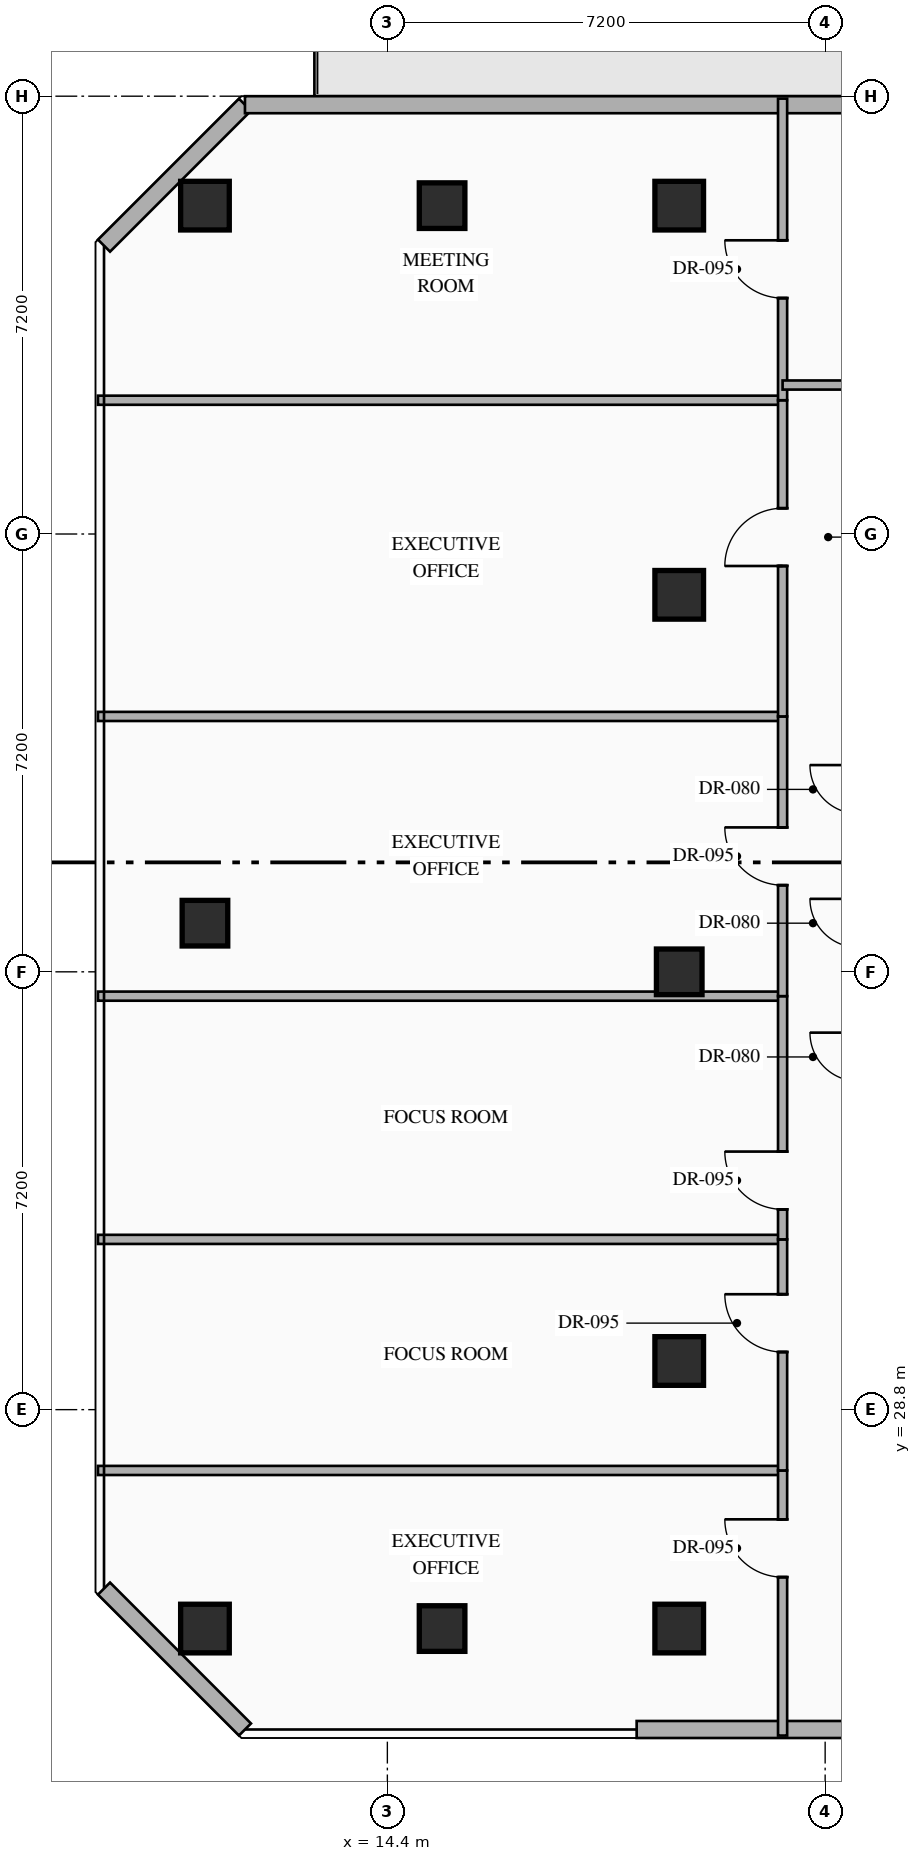
"""IFC4 building model, lengths in metres.
Left out: names, types, materials, properties, quantities, classifications, styles, units other than length and angle.
Written with IfcOpenShell. Run it as: python <this file> out.ifc"""

import sys

from ifc_helpers import new_model, si_unit, direction, frame, frame_2d, origin, origin_2d, place, context, subcontext, project, spatial, rectangle, hollow_rectangle, extrude, element, fill, save


model = new_model("IFC4")
c1 = context("Model", 3, precision=1e-05, world=origin(), true_north=direction((0.0, 1.0)))
c2 = subcontext(c1, "Body", "Model", "MODEL_VIEW")
j1 = project(units=[si_unit("LENGTHUNIT", "METRE"), si_unit("PLANEANGLEUNIT", "RADIAN")], contexts=[c1])
p1 = place(None, origin())
s1 = spatial("IfcSite", under=j1, at=p1, CompositionType="ELEMENT")
p2 = place(p1, origin())
s2 = spatial("IfcBuilding", under=s1, at=p2, CompositionType="ELEMENT")
p3 = place(p2, frame((0.0, 0.0, 167.25)))
s3 = spatial("IfcBuildingStorey", under=s2, at=p3, CompositionType="ELEMENT", Elevation=167.25)
for number, where, z_axis, x_axis in (
    (1, (11.4, 25.2, 0.0), (0.0, 0.0, 1.0), (1.0, 0.0, 0.0)),
    (2, (11.4, 48.6, 0.0), (0.0, 0.0, 1.0), (1.0, 0.0, 0.0)),
    (3, (19.2, 48.6, 0.0), (0.0, 0.0, 1.0), (1.0, 0.0, 0.0)),
    (4, (19.2, 25.2, 0.0), (0.0, 0.0, 1.0), (1.0, 0.0, 0.0)),
    (5, (19.2, 29.6, 0.0), (0.0, 0.0, 1.0), (1.0, 0.0, 0.0)),
    (6, (19.2, 42.2, 0.0), (0.0, 0.0, 1.0), (1.0, 0.0, 0.0)),
):
    element("IfcColumn", number, at=place(p3, frame(where, z_axis=z_axis, x_axis=x_axis)), inside=s3, PredefinedType="COLUMN", context=c2, shape_type="SweptSolid", body=[
        extrude(hollow_rectangle(XDim=0.8, YDim=0.8, WallThickness=0.032, at=origin_2d()), origin(), (0.0, 0.0, 1.0), 3.6),
    ])
for number, where, z_axis, x_axis in (
    (7, (11.4, 36.8, 0.0), (0.0, 0.0, 1.0), (1.0, 0.0, 0.0)),
    (8, (19.2, 36.0, 0.0), (0.0, 0.0, 1.0), (1.0, 0.0, 0.0)),
    (9, (15.3, 25.2, 0.0), (0.0, 0.0, 1.0), (1.0, 0.0, 0.0)),
    (10, (15.3, 48.6, 0.0), (0.0, 0.0, 1.0), (1.0, 0.0, 0.0)),
):
    element("IfcColumn", number, at=place(p3, frame(where, z_axis=z_axis, x_axis=x_axis)), inside=s3, PredefinedType="COLUMN", context=c2, shape_type="SweptSolid", body=[
        extrude(hollow_rectangle(XDim=0.75, YDim=0.75, WallThickness=0.028, at=origin_2d()), origin(), (0.0, 0.0, 1.0), 3.6),
    ])
p4 = place(p3, frame((25.247, 23.54, 0.0), z_axis=(0.0, 0.0, 1.0), x_axis=(-1.0, 0.0, 0.0)))
e11 = element("IfcWall", 11, at=p4, inside=s3, PredefinedType="STANDARD", context=c2, shape_type="SweptSolid", body=[
    extrude(rectangle(XDim=6.747, YDim=0.28, at=frame_2d((3.374, 0.0))), origin(), (0.0, 0.0, 1.0), 3.35),
])
p5 = place(p3, frame((12.058, 23.54, 0.0), z_axis=(0.0, 0.0, 1.0), x_axis=(-0.707144017911, 0.707069542501, 0.0)))
e12 = element("IfcWall", 12, at=p5, inside=s3, PredefinedType="STANDARD", context=c2, shape_type="SweptSolid", body=[
    extrude(rectangle(XDim=3.278, YDim=0.28, at=frame_2d((1.639, 0.0))), origin(), (0.0, 0.0, 1.0), 3.35),
])
p6 = place(p3, frame((9.74, 47.942, 0.0), z_axis=(0.0, 0.0, 1.0), x_axis=(0.707106781187, 0.707106781187, 0.0)))
e13 = element("IfcWall", 13, at=p6, inside=s3, PredefinedType="STANDARD", context=c2, shape_type="SweptSolid", body=[
    extrude(rectangle(XDim=3.278, YDim=0.28, at=frame_2d((1.639, 0.0))), origin(), (0.0, 0.0, 1.0), 3.35),
])
p7 = place(p3, frame((12.058, 50.26, 0.0), z_axis=(0.0, 0.0, 1.0), x_axis=(1.0, 0.0, 0.0)))
e14 = element("IfcWall", 14, at=p7, inside=s3, PredefinedType="STANDARD", context=c2, shape_type="SweptSolid", body=[
    extrude(rectangle(XDim=30.484, YDim=0.28, at=frame_2d((15.242, 0.0))), origin(), (0.0, 0.0, 1.0), 3.35),
])
p8 = place(p7, frame((14.992, 0.0, 0.0)))
e15 = element("IfcOpeningElement", 15, at=p8, cuts=e14, PredefinedType="OPENING", context=c2, shape_type="SweptSolid", body=[
    extrude(rectangle(XDim=1.1, YDim=2.2, at=frame_2d((0.55, 1.1))), frame((0.0, 0.15, 0.0), z_axis=(0.0, -1.0, 0.0), x_axis=(1.0, 0.0, 0.0)), (0.0, 0.0, 1.0), 0.3),
])
p9 = place(p7, frame((10.074, 0.0, 0.85)))
e16 = element("IfcOpeningElement", 16, at=p9, cuts=e14, PredefinedType="OPENING", context=c2, shape_type="SweptSolid", body=[
    extrude(rectangle(XDim=1.8, YDim=2.1, at=frame_2d((0.9, 1.05))), frame((0.0, 0.15, 0.0), z_axis=(0.0, -1.0, 0.0), x_axis=(1.0, 0.0, 0.0)), (0.0, 0.0, 1.0), 0.3),
])
p10 = place(p3, frame((9.64, 27.8, 0.0), z_axis=(0.0, 0.0, 1.0), x_axis=(1.0, 0.0, 0.0)))
e17 = element("IfcWall", 17, at=p10, inside=s3, PredefinedType="PARTITIONING", context=c2, shape_type="SweptSolid", body=[
    extrude(rectangle(XDim=11.26, YDim=0.15, at=frame_2d((5.63, 0.0))), origin(), (0.0, 0.0, 1.0), 3.35),
])
p11 = place(p3, frame((20.9, 23.44, 0.0), z_axis=(0.0, 0.0, 1.0), x_axis=(0.0, 1.0, 0.0)))
e18 = element("IfcWall", 18, at=p11, inside=s3, PredefinedType="PARTITIONING", context=c2, shape_type="SweptSolid", body=[
    extrude(rectangle(XDim=4.36, YDim=0.15, at=frame_2d((2.18, 0.0))), origin(), (0.0, 0.0, 1.0), 3.35),
])
p12 = place(p11, frame((2.606, 0.0, 0.0)))
e19 = element("IfcOpeningElement", 19, at=p12, cuts=e18, PredefinedType="OPENING", context=c2, shape_type="SweptSolid", body=[
    extrude(rectangle(XDim=0.95, YDim=2.15, at=frame_2d((0.475, 1.075))), frame((0.0, 0.085, 0.0), z_axis=(0.0, -1.0, 0.0), x_axis=(1.0, 0.0, 0.0)), (0.0, 0.0, 1.0), 0.17),
])
p13 = place(p3, frame((9.64, 31.6, 0.0), z_axis=(0.0, 0.0, 1.0), x_axis=(1.0, 0.0, 0.0)))
e20 = element("IfcWall", 20, at=p13, inside=s3, PredefinedType="PARTITIONING", context=c2, shape_type="SweptSolid", body=[
    extrude(rectangle(XDim=11.26, YDim=0.15, at=frame_2d((5.63, 0.0))), origin(), (0.0, 0.0, 1.0), 3.35),
])
p14 = place(p3, frame((20.9, 27.8, 0.0), z_axis=(0.0, 0.0, 1.0), x_axis=(0.0, 1.0, 0.0)))
e21 = element("IfcWall", 21, at=p14, inside=s3, PredefinedType="PARTITIONING", context=c2, shape_type="SweptSolid", body=[
    extrude(rectangle(XDim=3.8, YDim=0.15, at=frame_2d((1.9, 0.0))), origin(), (0.0, 0.0, 1.0), 3.35),
])
p15 = place(p14, frame((1.948, 0.0, 0.0)))
e22 = element("IfcOpeningElement", 22, at=p15, cuts=e21, PredefinedType="OPENING", context=c2, shape_type="SweptSolid", body=[
    extrude(rectangle(XDim=0.95, YDim=2.15, at=frame_2d((0.475, 1.075))), frame((0.0, 0.085, 0.0), z_axis=(0.0, -1.0, 0.0), x_axis=(1.0, 0.0, 0.0)), (0.0, 0.0, 1.0), 0.17),
])
p16 = place(p3, frame((9.64, 35.6, 0.0), z_axis=(0.0, 0.0, 1.0), x_axis=(1.0, 0.0, 0.0)))
e23 = element("IfcWall", 23, at=p16, inside=s3, PredefinedType="PARTITIONING", context=c2, shape_type="SweptSolid", body=[
    extrude(rectangle(XDim=11.26, YDim=0.15, at=frame_2d((5.63, 0.0))), origin(), (0.0, 0.0, 1.0), 3.35),
])
p17 = place(p3, frame((20.9, 31.6, 0.0), z_axis=(0.0, 0.0, 1.0), x_axis=(0.0, 1.0, 0.0)))
e24 = element("IfcWall", 24, at=p17, inside=s3, PredefinedType="PARTITIONING", context=c2, shape_type="SweptSolid", body=[
    extrude(rectangle(XDim=4.0, YDim=0.15, at=frame_2d((2.0, 0.0))), origin(), (0.0, 0.0, 1.0), 3.35),
])
p18 = place(p17, frame((0.494, 0.0, 0.0)))
e25 = element("IfcOpeningElement", 25, at=p18, cuts=e24, PredefinedType="OPENING", context=c2, shape_type="SweptSolid", body=[
    extrude(rectangle(XDim=0.95, YDim=2.15, at=frame_2d((0.475, 1.075))), frame((0.0, 0.085, 0.0), z_axis=(0.0, -1.0, 0.0), x_axis=(1.0, 0.0, 0.0)), (0.0, 0.0, 1.0), 0.17),
])
p19 = place(p3, frame((9.64, 40.2, 0.0), z_axis=(0.0, 0.0, 1.0), x_axis=(1.0, 0.0, 0.0)))
e26 = element("IfcWall", 26, at=p19, inside=s3, PredefinedType="PARTITIONING", context=c2, shape_type="SweptSolid", body=[
    extrude(rectangle(XDim=11.26, YDim=0.15, at=frame_2d((5.63, 0.0))), origin(), (0.0, 0.0, 1.0), 3.35),
])
p20 = place(p3, frame((20.9, 35.6, 0.0), z_axis=(0.0, 0.0, 1.0), x_axis=(0.0, 1.0, 0.0)))
e27 = element("IfcWall", 27, at=p20, inside=s3, PredefinedType="PARTITIONING", context=c2, shape_type="SweptSolid", body=[
    extrude(rectangle(XDim=4.6, YDim=0.15, at=frame_2d((2.3, 0.0))), origin(), (0.0, 0.0, 1.0), 3.35),
])
p21 = place(p20, frame((1.825, 0.0, 0.0)))
e28 = element("IfcOpeningElement", 28, at=p21, cuts=e27, PredefinedType="OPENING", context=c2, shape_type="SweptSolid", body=[
    extrude(rectangle(XDim=0.95, YDim=2.15, at=frame_2d((0.475, 1.075))), frame((0.0, 0.085, 0.0), z_axis=(0.0, -1.0, 0.0), x_axis=(1.0, 0.0, 0.0)), (0.0, 0.0, 1.0), 0.17),
])
p22 = place(p3, frame((9.64, 45.4, 0.0), z_axis=(0.0, 0.0, 1.0), x_axis=(1.0, 0.0, 0.0)))
e29 = element("IfcWall", 29, at=p22, inside=s3, PredefinedType="PARTITIONING", context=c2, shape_type="SweptSolid", body=[
    extrude(rectangle(XDim=11.26, YDim=0.15, at=frame_2d((5.63, 0.0))), origin(), (0.0, 0.0, 1.0), 3.35),
])
p23 = place(p3, frame((20.9, 40.2, 0.0), z_axis=(0.0, 0.0, 1.0), x_axis=(0.0, 1.0, 0.0)))
e30 = element("IfcWall", 30, at=p23, inside=s3, PredefinedType="PARTITIONING", context=c2, shape_type="SweptSolid", body=[
    extrude(rectangle(XDim=5.2, YDim=0.15, at=frame_2d((2.6, 0.0))), origin(), (0.0, 0.0, 1.0), 3.35),
])
p24 = place(p23, frame((2.474, 0.0, 0.0)))
e31 = element("IfcOpeningElement", 31, at=p24, cuts=e30, PredefinedType="OPENING", context=c2, shape_type="SweptSolid", body=[
    extrude(rectangle(XDim=0.95, YDim=2.15, at=frame_2d((0.475, 1.075))), frame((0.0, 0.085, 0.0), z_axis=(0.0, -1.0, 0.0), x_axis=(1.0, 0.0, 0.0)), (0.0, 0.0, 1.0), 0.17),
])
p25 = place(p3, frame((20.9, 45.4, 0.0), z_axis=(0.0, 0.0, 1.0), x_axis=(0.0, 1.0, 0.0)))
e32 = element("IfcWall", 32, at=p25, inside=s3, PredefinedType="PARTITIONING", context=c2, shape_type="SweptSolid", body=[
    extrude(rectangle(XDim=4.96, YDim=0.15, at=frame_2d((2.48, 0.0))), origin(), (0.0, 0.0, 1.0), 3.35),
])
p26 = place(p25, frame((1.68, 0.0, 0.0)))
e33 = element("IfcOpeningElement", 33, at=p26, cuts=e32, PredefinedType="OPENING", context=c2, shape_type="SweptSolid", body=[
    extrude(rectangle(XDim=0.95, YDim=2.15, at=frame_2d((0.475, 1.075))), frame((0.0, 0.085, 0.0), z_axis=(0.0, -1.0, 0.0), x_axis=(1.0, 0.0, 0.0)), (0.0, 0.0, 1.0), 0.17),
])
p27 = place(p3, frame((20.9, 45.65, 0.0), z_axis=(0.0, 0.0, 1.0), x_axis=(1.0, 0.0, 0.0)))
e34 = element("IfcWall", 34, at=p27, inside=s3, PredefinedType="PARTITIONING", context=c2, shape_type="SweptSolid", body=[
    extrude(rectangle(XDim=4.1, YDim=0.15, at=frame_2d((2.05, 0.0))), origin(), (0.0, 0.0, 1.0), 3.35),
])
p28 = place(p27, frame((1.575, 0.0, 0.0)))
e35 = element("IfcOpeningElement", 35, at=p28, cuts=e34, PredefinedType="OPENING", context=c2, shape_type="SweptSolid", body=[
    extrude(rectangle(XDim=0.95, YDim=2.15, at=frame_2d((0.475, 1.075))), frame((0.0, 0.085, 0.0), z_axis=(0.0, -1.0, 0.0), x_axis=(1.0, 0.0, 0.0)), (0.0, 0.0, 1.0), 0.17),
])
p29 = place(p12, origin())
e36 = element("IfcDoor", 36, at=p29, inside=s3, OperationType="SINGLE_SWING_RIGHT", PredefinedType="DOOR", context=c2, shape_type="SweptSolid", body=[
    extrude(rectangle(XDim=0.95, YDim=2.15, at=frame_2d((0.475, 1.075))), frame((0.0, 0.025, 0.0), z_axis=(0.0, -1.0, 0.0), x_axis=(1.0, 0.0, 0.0)), (0.0, 0.0, 1.0), 0.05),
])
fill(e19, e36)
p30 = place(p15, origin())
e37 = element("IfcDoor", 37, at=p30, inside=s3, OperationType="SINGLE_SWING_RIGHT", PredefinedType="DOOR", context=c2, shape_type="SweptSolid", body=[
    extrude(rectangle(XDim=0.95, YDim=2.15, at=frame_2d((0.475, 1.075))), frame((0.0, 0.025, 0.0), z_axis=(0.0, -1.0, 0.0), x_axis=(1.0, 0.0, 0.0)), (0.0, 0.0, 1.0), 0.05),
])
fill(e22, e37)
p31 = place(p18, origin())
e38 = element("IfcDoor", 38, at=p31, inside=s3, OperationType="SINGLE_SWING_RIGHT", PredefinedType="DOOR", context=c2, shape_type="SweptSolid", body=[
    extrude(rectangle(XDim=0.95, YDim=2.15, at=frame_2d((0.475, 1.075))), frame((0.0, 0.025, 0.0), z_axis=(0.0, -1.0, 0.0), x_axis=(1.0, 0.0, 0.0)), (0.0, 0.0, 1.0), 0.05),
])
fill(e25, e38)
p32 = place(p21, origin())
e39 = element("IfcDoor", 39, at=p32, inside=s3, OperationType="SINGLE_SWING_RIGHT", PredefinedType="DOOR", context=c2, shape_type="SweptSolid", body=[
    extrude(rectangle(XDim=0.95, YDim=2.15, at=frame_2d((0.475, 1.075))), frame((0.0, 0.025, 0.0), z_axis=(0.0, -1.0, 0.0), x_axis=(1.0, 0.0, 0.0)), (0.0, 0.0, 1.0), 0.05),
])
fill(e28, e39)
p33 = place(p24, origin())
e40 = element("IfcDoor", 40, at=p33, inside=s3, OperationType="SINGLE_SWING_LEFT", PredefinedType="DOOR", context=c2, shape_type="SweptSolid", body=[
    extrude(rectangle(XDim=0.95, YDim=2.15, at=frame_2d((0.475, 1.075))), frame((0.0, 0.025, 0.0), z_axis=(0.0, -1.0, 0.0), x_axis=(1.0, 0.0, 0.0)), (0.0, 0.0, 1.0), 0.05),
])
fill(e31, e40)
p34 = place(p26, origin())
e41 = element("IfcDoor", 41, at=p34, inside=s3, OperationType="SINGLE_SWING_RIGHT", PredefinedType="DOOR", context=c2, shape_type="SweptSolid", body=[
    extrude(rectangle(XDim=0.95, YDim=2.15, at=frame_2d((0.475, 1.075))), frame((0.0, 0.025, 0.0), z_axis=(0.0, -1.0, 0.0), x_axis=(1.0, 0.0, 0.0)), (0.0, 0.0, 1.0), 0.05),
])
fill(e33, e41)
save(model, sys.argv[1])
